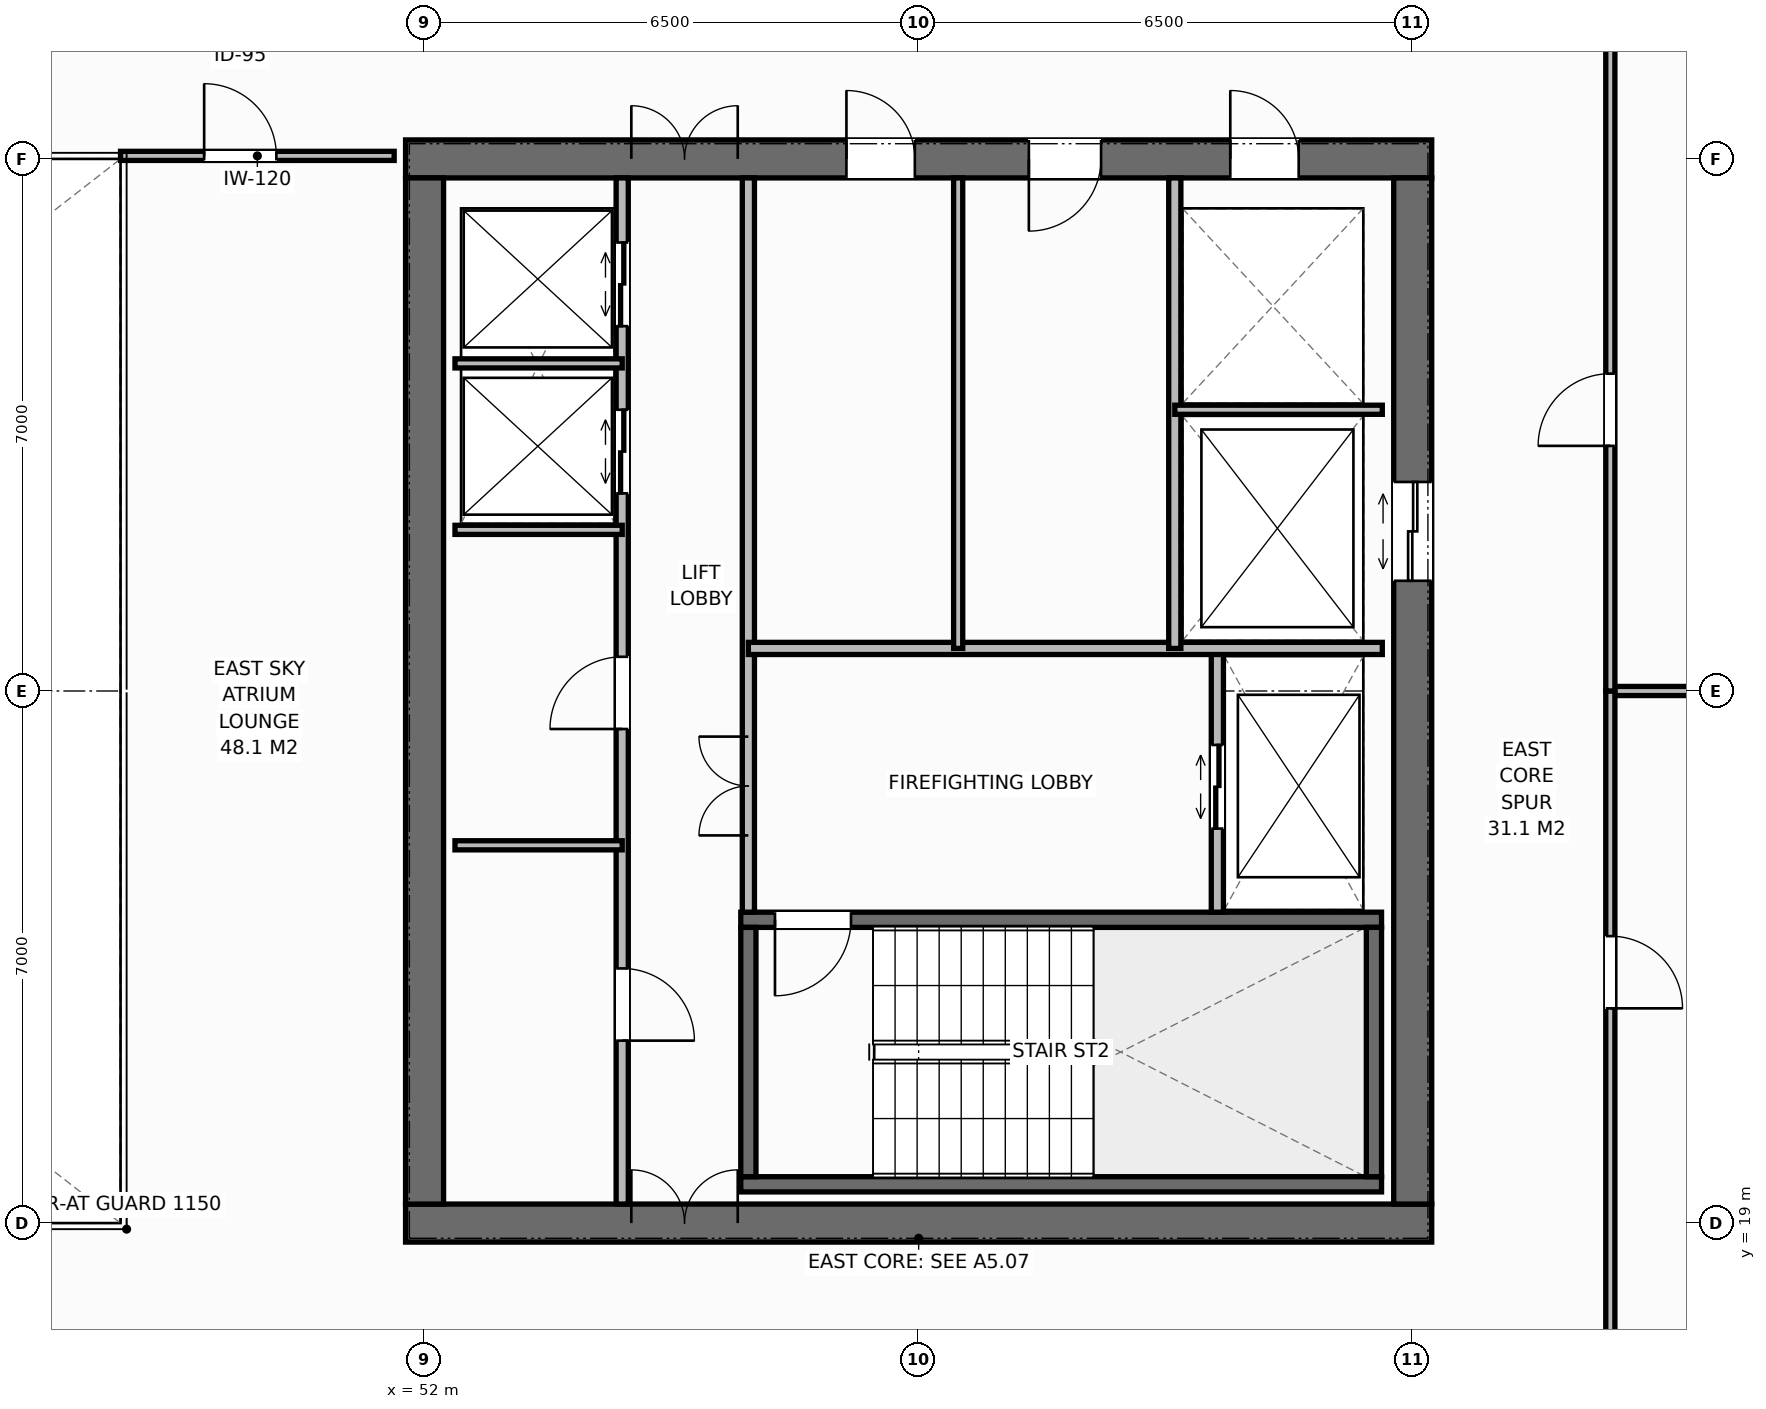
"""IFC4 building model, lengths in metres.
Left out: names, types, materials, properties, quantities, classifications, styles, units other than length and angle.
Written with IfcOpenShell. Run it as: python <this file> out.ifc"""

import sys

from ifc_helpers import new_model, si_unit, direction, frame, frame_2d, origin, place, context, subcontext, project, spatial, rectangle, extrude, element, fill, save


model = new_model("IFC4")
c1 = context("Model", 3, precision=1e-05, world=origin(), true_north=direction((0.0, 1.0)))
c2 = subcontext(c1, "Body", "Model", "MODEL_VIEW")
j1 = project(units=[si_unit("LENGTHUNIT", "METRE"), si_unit("PLANEANGLEUNIT", "RADIAN")], contexts=[c1])
p1 = place(None, origin())
s1 = spatial("IfcSite", under=j1, at=p1, CompositionType="ELEMENT")
p2 = place(p1, origin())
s2 = spatial("IfcBuilding", under=s1, at=p2, CompositionType="ELEMENT")
p3 = place(p2, frame((0.0, 0.0, 210.0)))
s3 = spatial("IfcBuildingStorey", under=s2, at=p3, CompositionType="ELEMENT", Elevation=210.0)
p4 = place(p3, frame((51.75, 19.0, 0.0), z_axis=(0.0, 0.0, 1.0), x_axis=(1.0, 0.0, 0.0)))
e1 = element("IfcWall", 1, at=p4, inside=s3, PredefinedType="SHEAR", context=c2, shape_type="SweptSolid", body=[
    extrude(rectangle(XDim=13.5, YDim=0.5, at=frame_2d((6.75, 0.0))), origin(), (0.0, 0.0, 1.0), 3.8),
])
p5 = place(p4, frame((2.97, 0.0, 0.0)))
e2 = element("IfcOpeningElement", 2, at=p5, cuts=e1, PredefinedType="OPENING", context=c2, shape_type="SweptSolid", body=[
    extrude(rectangle(XDim=1.4, YDim=2.2, at=frame_2d((0.7, 1.1))), frame((0.0, 0.26, 0.0), z_axis=(0.0, -1.0, 0.0), x_axis=(1.0, 0.0, 0.0)), (0.0, 0.0, 1.0), 0.52),
])
p6 = place(p3, frame((51.75, 33.0, 0.0), z_axis=(0.0, 0.0, 1.0), x_axis=(1.0, 0.0, 0.0)))
e3 = element("IfcWall", 3, at=p6, inside=s3, PredefinedType="SHEAR", context=c2, shape_type="SweptSolid", body=[
    extrude(rectangle(XDim=13.5, YDim=0.5, at=frame_2d((6.75, 0.0))), origin(), (0.0, 0.0, 1.0), 3.8),
])
p7 = place(p6, frame((2.97, 0.0, 0.0)))
e4 = element("IfcOpeningElement", 4, at=p7, cuts=e3, PredefinedType="OPENING", context=c2, shape_type="SweptSolid", body=[
    extrude(rectangle(XDim=1.4, YDim=2.2, at=frame_2d((0.7, 1.1))), frame((0.0, 0.26, 0.0), z_axis=(0.0, -1.0, 0.0), x_axis=(1.0, 0.0, 0.0)), (0.0, 0.0, 1.0), 0.52),
])
p8 = place(p6, frame((10.85, 0.0, 0.0)))
e5 = element("IfcOpeningElement", 5, at=p8, cuts=e3, PredefinedType="OPENING", context=c2, shape_type="SweptSolid", body=[
    extrude(rectangle(XDim=0.9, YDim=2.15, at=frame_2d((0.45, 1.075))), frame((0.0, 0.26, 0.0), z_axis=(0.0, -1.0, 0.0), x_axis=(1.0, 0.0, 0.0)), (0.0, 0.0, 1.0), 0.52),
])
p9 = place(p6, frame((5.8, 0.0, 0.0)))
e6 = element("IfcOpeningElement", 6, at=p9, cuts=e3, PredefinedType="OPENING", context=c2, shape_type="SweptSolid", body=[
    extrude(rectangle(XDim=0.9, YDim=2.15, at=frame_2d((0.45, 1.075))), frame((0.0, 0.26, 0.0), z_axis=(0.0, -1.0, 0.0), x_axis=(1.0, 0.0, 0.0)), (0.0, 0.0, 1.0), 0.52),
])
p10 = place(p6, frame((8.2, 0.0, 0.0)))
e7 = element("IfcOpeningElement", 7, at=p10, cuts=e3, PredefinedType="OPENING", context=c2, shape_type="SweptSolid", body=[
    extrude(rectangle(XDim=0.95, YDim=2.15, at=frame_2d((0.475, 1.075))), frame((0.0, 0.26, 0.0), z_axis=(0.0, -1.0, 0.0), x_axis=(1.0, 0.0, 0.0)), (0.0, 0.0, 1.0), 0.52),
])
p11 = place(p3, frame((52.0, 19.25, 0.0), z_axis=(0.0, 0.0, 1.0), x_axis=(0.0, 1.0, 0.0)))
e8 = element("IfcWall", 8, at=p11, inside=s3, PredefinedType="SHEAR", context=c2, shape_type="SweptSolid", body=[
    extrude(rectangle(XDim=13.5, YDim=0.5, at=frame_2d((6.75, 0.0))), origin(), (0.0, 0.0, 1.0), 3.8),
])
p12 = place(p3, frame((65.0, 19.25, 0.0), z_axis=(0.0, 0.0, 1.0), x_axis=(0.0, 1.0, 0.0)))
e9 = element("IfcWall", 9, at=p12, inside=s3, PredefinedType="SHEAR", context=c2, shape_type="SweptSolid", body=[
    extrude(rectangle(XDim=13.5, YDim=0.5, at=frame_2d((6.75, 0.0))), origin(), (0.0, 0.0, 1.0), 3.8),
])
p13 = place(p12, frame((8.2, 0.0, 0.0)))
e10 = element("IfcOpeningElement", 10, at=p13, cuts=e9, PredefinedType="OPENING", context=c2, shape_type="SweptSolid", body=[
    extrude(rectangle(XDim=1.3, YDim=2.2, at=frame_2d((0.65, 1.1))), frame((0.0, 0.26, 0.0), z_axis=(0.0, -1.0, 0.0), x_axis=(1.0, 0.0, 0.0)), (0.0, 0.0, 1.0), 0.52),
])
p14 = place(p3, frame((56.16, 19.51, 0.0), z_axis=(0.0, 0.0, 1.0), x_axis=(1.0, 0.0, 0.0)))
e11 = element("IfcWall", 11, at=p14, inside=s3, PredefinedType="SHEAR", context=c2, shape_type="SweptSolid", body=[
    extrude(rectangle(XDim=8.43, YDim=0.2, at=frame_2d((4.215, 0.0))), origin(), (0.0, 0.0, 1.0), 3.8),
])
p15 = place(p3, frame((56.16, 22.99, 0.0), z_axis=(0.0, 0.0, 1.0), x_axis=(1.0, 0.0, 0.0)))
e12 = element("IfcWall", 12, at=p15, inside=s3, PredefinedType="SHEAR", context=c2, shape_type="SweptSolid", body=[
    extrude(rectangle(XDim=8.43, YDim=0.2, at=frame_2d((4.215, 0.0))), origin(), (0.0, 0.0, 1.0), 3.8),
])
p16 = place(p15, frame((0.45, 0.0, 0.0)))
e13 = element("IfcOpeningElement", 13, at=p16, cuts=e12, PredefinedType="OPENING", context=c2, shape_type="SweptSolid", body=[
    extrude(rectangle(XDim=1.0, YDim=2.15, at=frame_2d((0.5, 1.075))), frame((0.0, 0.11, 0.0), z_axis=(0.0, -1.0, 0.0), x_axis=(1.0, 0.0, 0.0)), (0.0, 0.0, 1.0), 0.22),
])
for number, where, z_axis, x_axis in (
    (14, (56.26, 19.61, 0.0), (0.0, 0.0, 1.0), (0.0, 1.0, 0.0)),
    (15, (64.49, 19.61, 0.0), (0.0, 0.0, 1.0), (0.0, 1.0, 0.0)),
):
    element("IfcWall", number, at=place(p3, frame(where, z_axis=z_axis, x_axis=x_axis)), inside=s3, PredefinedType="SHEAR", context=c2, shape_type="SweptSolid", body=[
        extrude(rectangle(XDim=3.28, YDim=0.2, at=frame_2d((1.64, 0.0))), origin(), (0.0, 0.0, 1.0), 3.8),
    ])
p17 = place(p3, frame((54.6, 19.25, 0.0), z_axis=(0.0, 0.0, 1.0), x_axis=(0.0, 1.0, 0.0)))
e16 = element("IfcWall", 16, at=p17, inside=s3, PredefinedType="STANDARD", context=c2, shape_type="SweptSolid", body=[
    extrude(rectangle(XDim=13.5, YDim=0.16, at=frame_2d((6.75, 0.0))), origin(), (0.0, 0.0, 1.0), 3.58),
])
p18 = place(p17, frame((2.15, 0.0, 0.0)))
e17 = element("IfcOpeningElement", 17, at=p18, cuts=e16, PredefinedType="OPENING", context=c2, shape_type="SweptSolid", body=[
    extrude(rectangle(XDim=0.95, YDim=2.15, at=frame_2d((0.475, 1.075))), frame((0.0, 0.09, 0.0), z_axis=(0.0, -1.0, 0.0), x_axis=(1.0, 0.0, 0.0)), (0.0, 0.0, 1.0), 0.18),
])
p19 = place(p17, frame((6.25, 0.0, 0.0)))
e18 = element("IfcOpeningElement", 18, at=p19, cuts=e16, PredefinedType="OPENING", context=c2, shape_type="SweptSolid", body=[
    extrude(rectangle(XDim=0.95, YDim=2.15, at=frame_2d((0.475, 1.075))), frame((0.0, 0.09, 0.0), z_axis=(0.0, -1.0, 0.0), x_axis=(1.0, 0.0, 0.0)), (0.0, 0.0, 1.0), 0.18),
])
p20 = place(p17, frame((9.35, 0.0, 0.0)))
e19 = element("IfcOpeningElement", 19, at=p20, cuts=e16, PredefinedType="OPENING", context=c2, shape_type="SweptSolid", body=[
    extrude(rectangle(XDim=1.1, YDim=2.2, at=frame_2d((0.55, 1.1))), frame((0.0, 0.09, 0.0), z_axis=(0.0, -1.0, 0.0), x_axis=(1.0, 0.0, 0.0)), (0.0, 0.0, 1.0), 0.18),
])
p21 = place(p17, frame((11.55, 0.0, 0.0)))
e20 = element("IfcOpeningElement", 20, at=p21, cuts=e16, PredefinedType="OPENING", context=c2, shape_type="SweptSolid", body=[
    extrude(rectangle(XDim=1.1, YDim=2.2, at=frame_2d((0.55, 1.1))), frame((0.0, 0.09, 0.0), z_axis=(0.0, -1.0, 0.0), x_axis=(1.0, 0.0, 0.0)), (0.0, 0.0, 1.0), 0.18),
])
p22 = place(p3, frame((56.26, 23.09, 0.0), z_axis=(0.0, 0.0, 1.0), x_axis=(0.0, 1.0, 0.0)))
e21 = element("IfcWall", 21, at=p22, inside=s3, PredefinedType="STANDARD", context=c2, shape_type="SweptSolid", body=[
    extrude(rectangle(XDim=9.66, YDim=0.16, at=frame_2d((4.83, 0.0))), origin(), (0.0, 0.0, 1.0), 3.58),
])
p23 = place(p22, frame((1.01, 0.0, 0.0)))
e22 = element("IfcOpeningElement", 22, at=p23, cuts=e21, PredefinedType="OPENING", context=c2, shape_type="SweptSolid", body=[
    extrude(rectangle(XDim=1.3, YDim=2.2, at=frame_2d((0.65, 1.1))), frame((0.0, 0.09, 0.0), z_axis=(0.0, -1.0, 0.0), x_axis=(1.0, 0.0, 0.0)), (0.0, 0.0, 1.0), 0.18),
])
for number, where, z_axis, x_axis in (
    (23, (52.4, 23.97, 0.0), (0.0, 0.0, 1.0), (1.0, 0.0, 0.0)),
    (24, (52.4, 28.12, 0.0), (0.0, 0.0, 1.0), (1.0, 0.0, 0.0)),
    (25, (52.4, 30.31, 0.0), (0.0, 0.0, 1.0), (1.0, 0.0, 0.0)),
):
    element("IfcWall", number, at=place(p3, frame(where, z_axis=z_axis, x_axis=x_axis)), inside=s3, PredefinedType="PARTITIONING", context=c2, shape_type="SweptSolid", body=[
        extrude(rectangle(XDim=2.2, YDim=0.12, at=frame_2d((1.1, 0.0))), origin(), (0.0, 0.0, 1.0), 3.58),
    ])
p24 = place(p3, frame((62.43, 23.09, 0.0), z_axis=(0.0, 0.0, 1.0), x_axis=(0.0, 1.0, 0.0)))
e26 = element("IfcWall", 26, at=p24, inside=s3, PredefinedType="STANDARD", context=c2, shape_type="SweptSolid", body=[
    extrude(rectangle(XDim=3.47, YDim=0.16, at=frame_2d((1.735, 0.0))), origin(), (0.0, 0.0, 1.0), 3.58),
])
p25 = place(p24, frame((1.1, 0.0, 0.0)))
e27 = element("IfcOpeningElement", 27, at=p25, cuts=e26, PredefinedType="OPENING", context=c2, shape_type="SweptSolid", body=[
    extrude(rectangle(XDim=1.1, YDim=2.2, at=frame_2d((0.55, 1.1))), frame((0.0, 0.09, 0.0), z_axis=(0.0, -1.0, 0.0), x_axis=(1.0, 0.0, 0.0)), (0.0, 0.0, 1.0), 0.18),
])
p26 = place(p3, frame((56.26, 26.56, 0.0), z_axis=(0.0, 0.0, 1.0), x_axis=(1.0, 0.0, 0.0)))
e28 = element("IfcWall", 28, at=p26, inside=s3, PredefinedType="STANDARD", context=c2, shape_type="SweptSolid", body=[
    extrude(rectangle(XDim=8.34, YDim=0.16, at=frame_2d((4.17, 0.0))), origin(), (0.0, 0.0, 1.0), 3.58),
])
p27 = place(p3, frame((61.87, 26.56, 0.0), z_axis=(0.0, 0.0, 1.0), x_axis=(0.0, 1.0, 0.0)))
e29 = element("IfcWall", 29, at=p27, inside=s3, PredefinedType="STANDARD", context=c2, shape_type="SweptSolid", body=[
    extrude(rectangle(XDim=6.19, YDim=0.16, at=frame_2d((3.095, 0.0))), origin(), (0.0, 0.0, 1.0), 3.58),
])
p28 = place(p3, frame((61.87, 29.7, 0.0), z_axis=(0.0, 0.0, 1.0), x_axis=(1.0, 0.0, 0.0)))
e30 = element("IfcWall", 30, at=p28, inside=s3, PredefinedType="PARTITIONING", context=c2, shape_type="SweptSolid", body=[
    extrude(rectangle(XDim=2.73, YDim=0.12, at=frame_2d((1.365, 0.0))), origin(), (0.0, 0.0, 1.0), 3.58),
])
p29 = place(p3, frame((59.02, 26.56, 0.0), z_axis=(0.0, 0.0, 1.0), x_axis=(0.0, 1.0, 0.0)))
e31 = element("IfcWall", 31, at=p29, inside=s3, PredefinedType="PARTITIONING", context=c2, shape_type="SweptSolid", body=[
    extrude(rectangle(XDim=6.19, YDim=0.12, at=frame_2d((3.095, 0.0))), origin(), (0.0, 0.0, 1.0), 3.58),
])
p30 = place(p3, frame((48.0, 33.04, 0.0), z_axis=(0.0, 0.0, 1.0), x_axis=(1.0, 0.0, 0.0)))
e32 = element("IfcWall", 32, at=p30, inside=s3, PredefinedType="PARTITIONING", context=c2, shape_type="SweptSolid", body=[
    extrude(rectangle(XDim=3.6, YDim=0.12, at=frame_2d((1.8, 0.0))), origin(), (0.0, 0.0, 1.0), 3.32),
])
p31 = place(p30, frame((1.1, 0.0, 0.0)))
e33 = element("IfcOpeningElement", 33, at=p31, cuts=e32, PredefinedType="OPENING", context=c2, shape_type="SweptSolid", body=[
    extrude(rectangle(XDim=0.95, YDim=2.15, at=frame_2d((0.475, 1.075))), frame((0.0, 0.07, 0.0), z_axis=(0.0, -1.0, 0.0), x_axis=(1.0, 0.0, 0.0)), (0.0, 0.0, 1.0), 0.14),
])
p32 = place(p3, frame((67.6, 26.0, 0.0), z_axis=(0.0, 0.0, 1.0), x_axis=(1.0, 0.0, 0.0)))
e34 = element("IfcWall", 34, at=p32, inside=s3, PredefinedType="PARTITIONING", context=c2, shape_type="SweptSolid", body=[
    extrude(rectangle(XDim=4.58, YDim=0.12, at=frame_2d((2.29, 0.0))), origin(), (0.0, 0.0, 1.0), 3.58),
])
p33 = place(p3, frame((67.6, 16.5, 0.0), z_axis=(0.0, 0.0, 1.0), x_axis=(0.0, 1.0, 0.0)))
e35 = element("IfcWall", 35, at=p33, inside=s3, PredefinedType="PARTITIONING", context=c2, shape_type="SweptSolid", body=[
    extrude(rectangle(XDim=9.5, YDim=0.12, at=frame_2d((4.75, 0.0))), origin(), (0.0, 0.0, 1.0), 3.58),
])
p34 = place(p33, frame((5.325, 0.0, 0.0)))
e36 = element("IfcOpeningElement", 36, at=p34, cuts=e35, PredefinedType="OPENING", context=c2, shape_type="SweptSolid", body=[
    extrude(rectangle(XDim=0.95, YDim=2.15, at=frame_2d((0.475, 1.075))), frame((0.0, 0.07, 0.0), z_axis=(0.0, -1.0, 0.0), x_axis=(1.0, 0.0, 0.0)), (0.0, 0.0, 1.0), 0.14),
])
p35 = place(p3, frame((67.6, 26.0, 0.0), z_axis=(0.0, 0.0, 1.0), x_axis=(0.0, 1.0, 0.0)))
e37 = element("IfcWall", 37, at=p35, inside=s3, PredefinedType="PARTITIONING", context=c2, shape_type="SweptSolid", body=[
    extrude(rectangle(XDim=9.5, YDim=0.12, at=frame_2d((4.75, 0.0))), origin(), (0.0, 0.0, 1.0), 3.58),
])
p36 = place(p35, frame((3.225, 0.0, 0.0)))
e38 = element("IfcOpeningElement", 38, at=p36, cuts=e37, PredefinedType="OPENING", context=c2, shape_type="SweptSolid", body=[
    extrude(rectangle(XDim=0.95, YDim=2.15, at=frame_2d((0.475, 1.075))), frame((0.0, 0.07, 0.0), z_axis=(0.0, -1.0, 0.0), x_axis=(1.0, 0.0, 0.0)), (0.0, 0.0, 1.0), 0.14),
])
p37 = place(p5, origin())
e39 = element("IfcDoor", 39, at=p37, inside=s3, OperationType="DOUBLE_DOOR_SINGLE_SWING", PredefinedType="DOOR", context=c2, shape_type="SweptSolid", body=[
    extrude(rectangle(XDim=1.4, YDim=2.2, at=frame_2d((0.7, 1.1))), frame((0.0, 0.075, 0.0), z_axis=(0.0, -1.0, 0.0), x_axis=(1.0, 0.0, 0.0)), (0.0, 0.0, 1.0), 0.05),
])
fill(e2, e39)
p38 = place(p7, origin())
e40 = element("IfcDoor", 40, at=p38, inside=s3, OperationType="DOUBLE_DOOR_SINGLE_SWING", PredefinedType="DOOR", context=c2, shape_type="SweptSolid", body=[
    extrude(rectangle(XDim=1.4, YDim=2.2, at=frame_2d((0.7, 1.1))), frame((0.0, -0.025, 0.0), z_axis=(0.0, -1.0, 0.0), x_axis=(1.0, 0.0, 0.0)), (0.0, 0.0, 1.0), 0.05),
])
fill(e4, e40)
p39 = place(p18, origin())
e41 = element("IfcDoor", 41, at=p39, inside=s3, OperationType="SINGLE_SWING_RIGHT", PredefinedType="DOOR", context=c2, shape_type="SweptSolid", body=[
    extrude(rectangle(XDim=0.95, YDim=2.15, at=frame_2d((0.475, 1.075))), frame((0.0, 0.025, 0.0), z_axis=(0.0, -1.0, 0.0), x_axis=(1.0, 0.0, 0.0)), (0.0, 0.0, 1.0), 0.05),
])
fill(e17, e41)
p40 = place(p19, origin())
e42 = element("IfcDoor", 42, at=p40, inside=s3, OperationType="SINGLE_SWING_LEFT", PredefinedType="DOOR", context=c2, shape_type="SweptSolid", body=[
    extrude(rectangle(XDim=0.95, YDim=2.15, at=frame_2d((0.475, 1.075))), frame((0.0, 0.025, 0.0), z_axis=(0.0, -1.0, 0.0), x_axis=(1.0, 0.0, 0.0)), (0.0, 0.0, 1.0), 0.05),
])
fill(e18, e42)
p41 = place(p20, origin())
e43 = element("IfcDoor", 43, at=p41, inside=s3, OperationType="DOUBLE_DOOR_SLIDING", PredefinedType="DOOR", context=c2, shape_type="SweptSolid", body=[
    extrude(rectangle(XDim=1.1, YDim=2.2, at=frame_2d((0.55, 1.1))), frame((0.0, 0.025, 0.0), z_axis=(0.0, -1.0, 0.0), x_axis=(1.0, 0.0, 0.0)), (0.0, 0.0, 1.0), 0.05),
])
fill(e19, e43)
p42 = place(p21, origin())
e44 = element("IfcDoor", 44, at=p42, inside=s3, OperationType="DOUBLE_DOOR_SLIDING", PredefinedType="DOOR", context=c2, shape_type="SweptSolid", body=[
    extrude(rectangle(XDim=1.1, YDim=2.2, at=frame_2d((0.55, 1.1))), frame((0.0, 0.025, 0.0), z_axis=(0.0, -1.0, 0.0), x_axis=(1.0, 0.0, 0.0)), (0.0, 0.0, 1.0), 0.05),
])
fill(e20, e44)
p43 = place(p16, origin())
e45 = element("IfcDoor", 45, at=p43, inside=s3, OperationType="SINGLE_SWING_RIGHT", PredefinedType="DOOR", context=c2, shape_type="SweptSolid", body=[
    extrude(rectangle(XDim=1.0, YDim=2.15, at=frame_2d((0.5, 1.075))), frame((0.0, 0.025, 0.0), z_axis=(0.0, -1.0, 0.0), x_axis=(1.0, 0.0, 0.0)), (0.0, 0.0, 1.0), 0.05),
])
fill(e13, e45)
p44 = place(p25, origin())
e46 = element("IfcDoor", 46, at=p44, inside=s3, OperationType="DOUBLE_DOOR_SLIDING", PredefinedType="DOOR", context=c2, shape_type="SweptSolid", body=[
    extrude(rectangle(XDim=1.1, YDim=2.2, at=frame_2d((0.55, 1.1))), frame((0.0, 0.025, 0.0), z_axis=(0.0, -1.0, 0.0), x_axis=(1.0, 0.0, 0.0)), (0.0, 0.0, 1.0), 0.05),
])
fill(e27, e46)
p45 = place(p23, origin())
e47 = element("IfcDoor", 47, at=p45, inside=s3, OperationType="DOUBLE_DOOR_SINGLE_SWING", PredefinedType="DOOR", context=c2, shape_type="SweptSolid", body=[
    extrude(rectangle(XDim=1.3, YDim=2.2, at=frame_2d((0.65, 1.1))), frame((0.0, 0.025, 0.0), z_axis=(0.0, -1.0, 0.0), x_axis=(1.0, 0.0, 0.0)), (0.0, 0.0, 1.0), 0.05),
])
fill(e22, e47)
p46 = place(p13, origin())
e48 = element("IfcDoor", 48, at=p46, inside=s3, OperationType="DOUBLE_DOOR_SLIDING", PredefinedType="DOOR", context=c2, shape_type="SweptSolid", body=[
    extrude(rectangle(XDim=1.3, YDim=2.2, at=frame_2d((0.65, 1.1))), frame((0.0, 0.025, 0.0), z_axis=(0.0, -1.0, 0.0), x_axis=(1.0, 0.0, 0.0)), (0.0, 0.0, 1.0), 0.05),
])
fill(e10, e48)
p47 = place(p8, origin())
e49 = element("IfcDoor", 49, at=p47, inside=s3, OperationType="SINGLE_SWING_LEFT", PredefinedType="DOOR", context=c2, shape_type="SweptSolid", body=[
    extrude(rectangle(XDim=0.9, YDim=2.15, at=frame_2d((0.45, 1.075))), frame((0.0, -0.025, 0.0), z_axis=(0.0, -1.0, 0.0), x_axis=(1.0, 0.0, 0.0)), (0.0, 0.0, 1.0), 0.05),
])
fill(e5, e49)
p48 = place(p9, origin())
e50 = element("IfcDoor", 50, at=p48, inside=s3, OperationType="SINGLE_SWING_LEFT", PredefinedType="DOOR", context=c2, shape_type="SweptSolid", body=[
    extrude(rectangle(XDim=0.9, YDim=2.15, at=frame_2d((0.45, 1.075))), frame((0.0, -0.025, 0.0), z_axis=(0.0, -1.0, 0.0), x_axis=(1.0, 0.0, 0.0)), (0.0, 0.0, 1.0), 0.05),
])
fill(e6, e50)
p49 = place(p10, origin())
e51 = element("IfcDoor", 51, at=p49, inside=s3, OperationType="SINGLE_SWING_RIGHT", PredefinedType="DOOR", context=c2, shape_type="SweptSolid", body=[
    extrude(rectangle(XDim=0.95, YDim=2.15, at=frame_2d((0.475, 1.075))), frame((0.0, -0.025, 0.0), z_axis=(0.0, -1.0, 0.0), x_axis=(1.0, 0.0, 0.0)), (0.0, 0.0, 1.0), 0.05),
])
fill(e7, e51)
p50 = place(p31, origin())
e52 = element("IfcDoor", 52, at=p50, inside=s3, OperationType="SINGLE_SWING_LEFT", PredefinedType="DOOR", context=c2, shape_type="SweptSolid", body=[
    extrude(rectangle(XDim=0.95, YDim=2.15, at=frame_2d((0.475, 1.075))), frame((0.0, 0.025, 0.0), z_axis=(0.0, -1.0, 0.0), x_axis=(1.0, 0.0, 0.0)), (0.0, 0.0, 1.0), 0.05),
])
fill(e33, e52)
p51 = place(p34, origin())
e53 = element("IfcDoor", 53, at=p51, inside=s3, OperationType="SINGLE_SWING_RIGHT", PredefinedType="DOOR", context=c2, shape_type="SweptSolid", body=[
    extrude(rectangle(XDim=0.95, YDim=2.15, at=frame_2d((0.475, 1.075))), frame((0.0, 0.025, 0.0), z_axis=(0.0, -1.0, 0.0), x_axis=(1.0, 0.0, 0.0)), (0.0, 0.0, 1.0), 0.05),
])
fill(e36, e53)
p52 = place(p36, origin())
e54 = element("IfcDoor", 54, at=p52, inside=s3, OperationType="SINGLE_SWING_LEFT", PredefinedType="DOOR", context=c2, shape_type="SweptSolid", body=[
    extrude(rectangle(XDim=0.95, YDim=2.15, at=frame_2d((0.475, 1.075))), frame((0.0, 0.025, 0.0), z_axis=(0.0, -1.0, 0.0), x_axis=(1.0, 0.0, 0.0)), (0.0, 0.0, 1.0), 0.05),
])
fill(e38, e54)
save(model, sys.argv[1])
